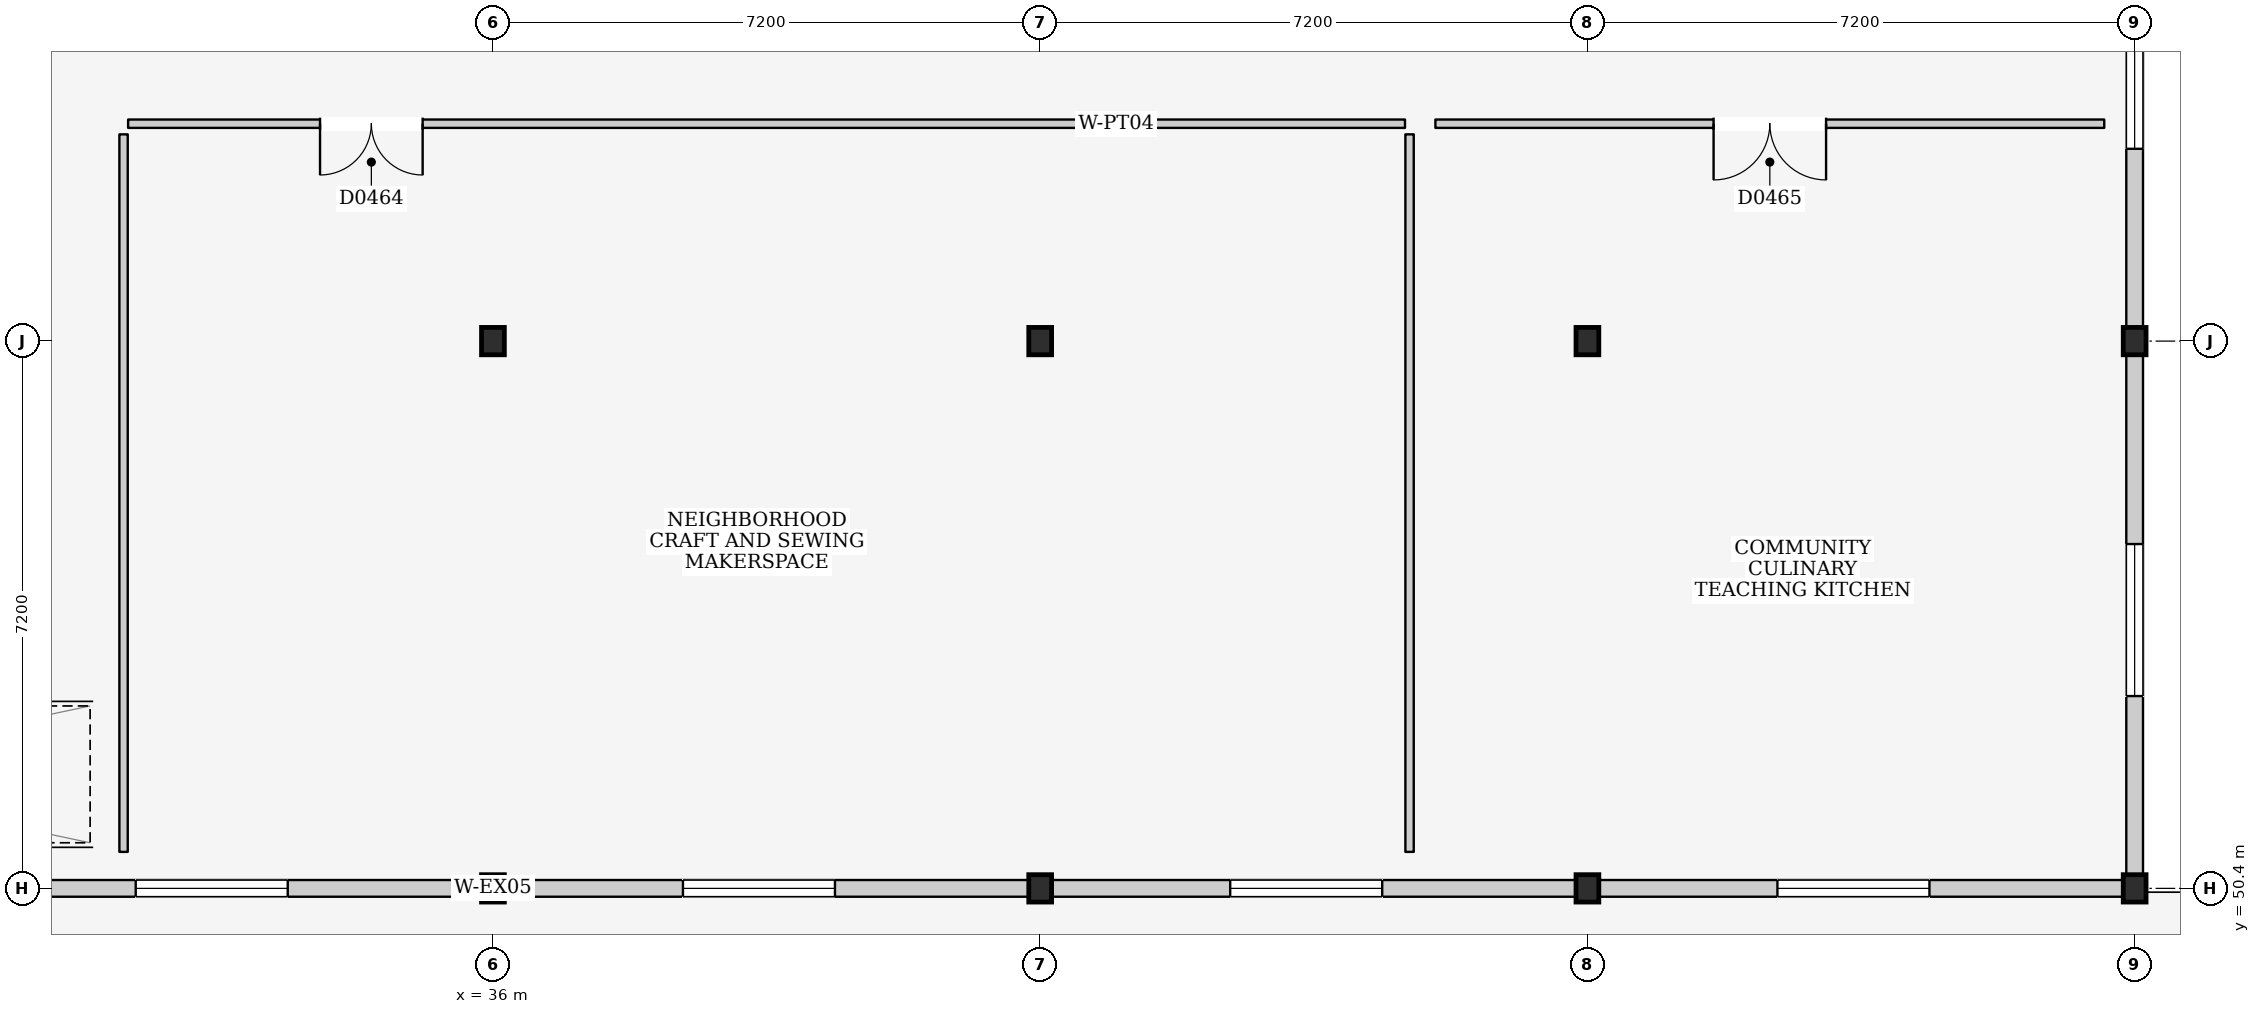
"""IFC4 building model, lengths in metres.
Left out: names, types, materials, properties, quantities, classifications, styles, units other than length and angle.
Written with IfcOpenShell. Run it as: python <this file> out.ifc"""

import sys

from ifc_helpers import new_model, si_unit, direction, frame, frame_2d, origin, origin_2d, place, context, subcontext, project, spatial, rectangle, i_section, extrude, element, fill, save


model = new_model("IFC4")
c1 = context("Model", 3, precision=1e-05, world=origin(), true_north=direction((0.0, 1.0)))
c2 = subcontext(c1, "Body", "Model", "MODEL_VIEW")
j1 = project(units=[si_unit("LENGTHUNIT", "METRE"), si_unit("PLANEANGLEUNIT", "RADIAN")], contexts=[c1])
p1 = place(None, origin())
s1 = spatial("IfcSite", under=j1, at=p1, CompositionType="ELEMENT")
p2 = place(p1, origin())
s2 = spatial("IfcBuilding", under=s1, at=p2, CompositionType="ELEMENT")
p3 = place(p2, frame((0.0, 0.0, 4.5)))
s3 = spatial("IfcBuildingStorey", under=s2, at=p3, CompositionType="ELEMENT", Elevation=4.5)
for number, where, z_axis, x_axis in (
    (1, (36.0, 50.4, 0.0), (0.0, 0.0, 1.0), (1.0, 0.0, 0.0)),
    (2, (36.0, 57.6, 0.0), (0.0, 0.0, 1.0), (1.0, 0.0, 0.0)),
    (3, (43.2, 50.4, 0.0), (0.0, 0.0, 1.0), (1.0, 0.0, 0.0)),
    (4, (43.2, 57.6, 0.0), (0.0, 0.0, 1.0), (1.0, 0.0, 0.0)),
    (5, (50.4, 50.4, 0.0), (0.0, 0.0, 1.0), (1.0, 0.0, 0.0)),
    (6, (50.4, 57.6, 0.0), (0.0, 0.0, 1.0), (1.0, 0.0, 0.0)),
    (7, (57.6, 50.4, 0.0), (0.0, 0.0, 1.0), (1.0, 0.0, 0.0)),
    (8, (57.6, 57.6, 0.0), (0.0, 0.0, 1.0), (1.0, 0.0, 0.0)),
):
    element("IfcColumn", number, at=place(p3, frame(where, z_axis=z_axis, x_axis=x_axis)), inside=s3, PredefinedType="COLUMN", context=c2, shape_type="SweptSolid", body=[
        extrude(i_section(OverallWidth=0.3, OverallDepth=0.36, WebThickness=0.012, FlangeThickness=0.022, at=origin_2d()), origin(), (0.0, 0.0, 1.0), 4.5),
    ])
p4 = place(p3, frame((28.95, 50.4, 0.0), z_axis=(0.0, 0.0, 1.0), x_axis=(1.0, 0.0, 0.0)))
e9 = element("IfcWall", 9, at=p4, inside=s3, PredefinedType="ELEMENTEDWALL", context=c2, shape_type="SweptSolid", body=[
    extrude(rectangle(XDim=6.9, YDim=0.22, at=frame_2d((3.45, 0.0))), origin(), (0.0, 0.0, 1.0), 3.9),
])
p5 = place(p4, frame((2.35, 0.0, 0.95)))
e10 = element("IfcOpeningElement", 10, at=p5, cuts=e9, PredefinedType="OPENING", context=c2, shape_type="SweptSolid", body=[
    extrude(rectangle(XDim=2.0, YDim=1.5, at=frame_2d((1.0, 0.75))), frame((0.0, 0.125, 0.0), z_axis=(0.0, -1.0, 0.0), x_axis=(1.0, 0.0, 0.0)), (0.0, 0.0, 1.0), 0.25),
])
p6 = place(p3, frame((36.15, 50.4, 0.0), z_axis=(0.0, 0.0, 1.0), x_axis=(1.0, 0.0, 0.0)))
e11 = element("IfcWall", 11, at=p6, inside=s3, PredefinedType="ELEMENTEDWALL", context=c2, shape_type="SweptSolid", body=[
    extrude(rectangle(XDim=6.9, YDim=0.22, at=frame_2d((3.45, 0.0))), origin(), (0.0, 0.0, 1.0), 3.9),
])
p7 = place(p6, frame((2.35, 0.0, 0.95)))
e12 = element("IfcOpeningElement", 12, at=p7, cuts=e11, PredefinedType="OPENING", context=c2, shape_type="SweptSolid", body=[
    extrude(rectangle(XDim=2.0, YDim=1.5, at=frame_2d((1.0, 0.75))), frame((0.0, 0.125, 0.0), z_axis=(0.0, -1.0, 0.0), x_axis=(1.0, 0.0, 0.0)), (0.0, 0.0, 1.0), 0.25),
])
p8 = place(p3, frame((43.35, 50.4, 0.0), z_axis=(0.0, 0.0, 1.0), x_axis=(1.0, 0.0, 0.0)))
e13 = element("IfcWall", 13, at=p8, inside=s3, PredefinedType="ELEMENTEDWALL", context=c2, shape_type="SweptSolid", body=[
    extrude(rectangle(XDim=6.9, YDim=0.22, at=frame_2d((3.45, 0.0))), origin(), (0.0, 0.0, 1.0), 3.9),
])
p9 = place(p8, frame((2.35, 0.0, 0.95)))
e14 = element("IfcOpeningElement", 14, at=p9, cuts=e13, PredefinedType="OPENING", context=c2, shape_type="SweptSolid", body=[
    extrude(rectangle(XDim=2.0, YDim=1.5, at=frame_2d((1.0, 0.75))), frame((0.0, 0.125, 0.0), z_axis=(0.0, -1.0, 0.0), x_axis=(1.0, 0.0, 0.0)), (0.0, 0.0, 1.0), 0.25),
])
p10 = place(p3, frame((50.55, 50.4, 0.0), z_axis=(0.0, 0.0, 1.0), x_axis=(1.0, 0.0, 0.0)))
e15 = element("IfcWall", 15, at=p10, inside=s3, PredefinedType="ELEMENTEDWALL", context=c2, shape_type="SweptSolid", body=[
    extrude(rectangle(XDim=6.9, YDim=0.22, at=frame_2d((3.45, 0.0))), origin(), (0.0, 0.0, 1.0), 3.9),
])
p11 = place(p10, frame((2.35, 0.0, 0.95)))
e16 = element("IfcOpeningElement", 16, at=p11, cuts=e15, PredefinedType="OPENING", context=c2, shape_type="SweptSolid", body=[
    extrude(rectangle(XDim=2.0, YDim=1.5, at=frame_2d((1.0, 0.75))), frame((0.0, 0.125, 0.0), z_axis=(0.0, -1.0, 0.0), x_axis=(1.0, 0.0, 0.0)), (0.0, 0.0, 1.0), 0.25),
])
p12 = place(p3, frame((57.6, 50.58, 0.0), z_axis=(0.0, 0.0, 1.0), x_axis=(0.0, 1.0, 0.0)))
e17 = element("IfcWall", 17, at=p12, inside=s3, PredefinedType="ELEMENTEDWALL", context=c2, shape_type="SweptSolid", body=[
    extrude(rectangle(XDim=6.84, YDim=0.22, at=frame_2d((3.42, 0.0))), origin(), (0.0, 0.0, 1.0), 3.9),
])
p13 = place(p12, frame((2.35, 0.0, 0.95)))
e18 = element("IfcOpeningElement", 18, at=p13, cuts=e17, PredefinedType="OPENING", context=c2, shape_type="SweptSolid", body=[
    extrude(rectangle(XDim=2.0, YDim=1.5, at=frame_2d((1.0, 0.75))), frame((0.0, 0.125, 0.0), z_axis=(0.0, -1.0, 0.0), x_axis=(1.0, 0.0, 0.0)), (0.0, 0.0, 1.0), 0.25),
])
p14 = place(p3, frame((57.6, 57.78, 0.0), z_axis=(0.0, 0.0, 1.0), x_axis=(0.0, 1.0, 0.0)))
e19 = element("IfcWall", 19, at=p14, inside=s3, PredefinedType="ELEMENTEDWALL", context=c2, shape_type="SweptSolid", body=[
    extrude(rectangle(XDim=6.84, YDim=0.22, at=frame_2d((3.42, 0.0))), origin(), (0.0, 0.0, 1.0), 3.9),
])
p15 = place(p14, frame((2.35, 0.0, 0.95)))
e20 = element("IfcOpeningElement", 20, at=p15, cuts=e19, PredefinedType="OPENING", context=c2, shape_type="SweptSolid", body=[
    extrude(rectangle(XDim=2.0, YDim=1.5, at=frame_2d((1.0, 0.75))), frame((0.0, 0.125, 0.0), z_axis=(0.0, -1.0, 0.0), x_axis=(1.0, 0.0, 0.0)), (0.0, 0.0, 1.0), 0.25),
])
p16 = place(p3, frame((31.2, 60.46, 0.0), z_axis=(0.0, 0.0, 1.0), x_axis=(1.0, 0.0, 0.0)))
e21 = element("IfcWall", 21, at=p16, inside=s3, PredefinedType="PARTITIONING", context=c2, shape_type="SweptSolid", body=[
    extrude(rectangle(XDim=16.8, YDim=0.11, at=frame_2d((8.4, 0.0))), origin(), (0.0, 0.0, 1.0), 4.25),
])
p17 = place(p16, frame((2.525, 0.0, 0.0)))
e22 = element("IfcOpeningElement", 22, at=p17, cuts=e21, PredefinedType="OPENING", context=c2, shape_type="SweptSolid", body=[
    extrude(rectangle(XDim=1.35, YDim=2.3, at=frame_2d((0.675, 1.15))), frame((0.0, 0.07, 0.0), z_axis=(0.0, -1.0, 0.0), x_axis=(1.0, 0.0, 0.0)), (0.0, 0.0, 1.0), 0.14),
])
for number, where, z_axis, x_axis in (
    (23, (31.14, 50.88, 0.0), (0.0, 0.0, 1.0), (0.0, 1.0, 0.0)),
    (24, (48.06, 50.88, 0.0), (0.0, 0.0, 1.0), (0.0, 1.0, 0.0)),
):
    element("IfcWall", number, at=place(p3, frame(where, z_axis=z_axis, x_axis=x_axis)), inside=s3, PredefinedType="PARTITIONING", context=c2, shape_type="SweptSolid", body=[
        extrude(rectangle(XDim=9.44, YDim=0.11, at=frame_2d((4.72, 0.0))), origin(), (0.0, 0.0, 1.0), 4.25),
    ])
p18 = place(p3, frame((48.4, 60.46, 0.0), z_axis=(0.0, 0.0, 1.0), x_axis=(1.0, 0.0, 0.0)))
e25 = element("IfcWall", 25, at=p18, inside=s3, PredefinedType="PARTITIONING", context=c2, shape_type="SweptSolid", body=[
    extrude(rectangle(XDim=8.8, YDim=0.11, at=frame_2d((4.4, 0.0))), origin(), (0.0, 0.0, 1.0), 4.25),
])
p19 = place(p18, frame((3.66, 0.0, 0.0)))
e26 = element("IfcOpeningElement", 26, at=p19, cuts=e25, PredefinedType="OPENING", context=c2, shape_type="SweptSolid", body=[
    extrude(rectangle(XDim=1.48, YDim=2.3, at=frame_2d((0.74, 1.15))), frame((0.0, 0.07, 0.0), z_axis=(0.0, -1.0, 0.0), x_axis=(1.0, 0.0, 0.0)), (0.0, 0.0, 1.0), 0.14),
])
p20 = place(p5, origin())
e27 = element("IfcWindow", 27, at=p20, inside=s3, PartitioningType="DOUBLE_PANEL_VERTICAL", PredefinedType="WINDOW", context=c2, shape_type="SweptSolid", body=[
    extrude(rectangle(XDim=2.0, YDim=1.5, at=frame_2d((1.0, 0.75))), frame((0.0, 0.03, 0.0), z_axis=(0.0, -1.0, 0.0), x_axis=(1.0, 0.0, 0.0)), (0.0, 0.0, 1.0), 0.06),
])
fill(e10, e27)
p21 = place(p7, origin())
e28 = element("IfcWindow", 28, at=p21, inside=s3, PartitioningType="DOUBLE_PANEL_VERTICAL", PredefinedType="WINDOW", context=c2, shape_type="SweptSolid", body=[
    extrude(rectangle(XDim=2.0, YDim=1.5, at=frame_2d((1.0, 0.75))), frame((0.0, 0.03, 0.0), z_axis=(0.0, -1.0, 0.0), x_axis=(1.0, 0.0, 0.0)), (0.0, 0.0, 1.0), 0.06),
])
fill(e12, e28)
p22 = place(p9, origin())
e29 = element("IfcWindow", 29, at=p22, inside=s3, PartitioningType="DOUBLE_PANEL_VERTICAL", PredefinedType="WINDOW", context=c2, shape_type="SweptSolid", body=[
    extrude(rectangle(XDim=2.0, YDim=1.5, at=frame_2d((1.0, 0.75))), frame((0.0, 0.03, 0.0), z_axis=(0.0, -1.0, 0.0), x_axis=(1.0, 0.0, 0.0)), (0.0, 0.0, 1.0), 0.06),
])
fill(e14, e29)
p23 = place(p11, origin())
e30 = element("IfcWindow", 30, at=p23, inside=s3, PartitioningType="DOUBLE_PANEL_VERTICAL", PredefinedType="WINDOW", context=c2, shape_type="SweptSolid", body=[
    extrude(rectangle(XDim=2.0, YDim=1.5, at=frame_2d((1.0, 0.75))), frame((0.0, 0.03, 0.0), z_axis=(0.0, -1.0, 0.0), x_axis=(1.0, 0.0, 0.0)), (0.0, 0.0, 1.0), 0.06),
])
fill(e16, e30)
p24 = place(p13, origin())
e31 = element("IfcWindow", 31, at=p24, inside=s3, PartitioningType="DOUBLE_PANEL_VERTICAL", PredefinedType="WINDOW", context=c2, shape_type="SweptSolid", body=[
    extrude(rectangle(XDim=2.0, YDim=1.5, at=frame_2d((1.0, 0.75))), frame((0.0, 0.03, 0.0), z_axis=(0.0, -1.0, 0.0), x_axis=(1.0, 0.0, 0.0)), (0.0, 0.0, 1.0), 0.06),
])
fill(e18, e31)
p25 = place(p15, origin())
e32 = element("IfcWindow", 32, at=p25, inside=s3, PartitioningType="DOUBLE_PANEL_VERTICAL", PredefinedType="WINDOW", context=c2, shape_type="SweptSolid", body=[
    extrude(rectangle(XDim=2.0, YDim=1.5, at=frame_2d((1.0, 0.75))), frame((0.0, 0.03, 0.0), z_axis=(0.0, -1.0, 0.0), x_axis=(1.0, 0.0, 0.0)), (0.0, 0.0, 1.0), 0.06),
])
fill(e20, e32)
p26 = place(p17, frame((1.35, 0.0, 0.0), z_axis=(0.0, 0.0, 1.0), x_axis=(-1.0, 0.0, 0.0)))
e33 = element("IfcDoor", 33, at=p26, inside=s3, OperationType="DOUBLE_DOOR_SINGLE_SWING", PredefinedType="DOOR", context=c2, shape_type="SweptSolid", body=[
    extrude(rectangle(XDim=1.35, YDim=2.3, at=frame_2d((0.675, 1.15))), frame((0.0, 0.025, 0.0), z_axis=(0.0, -1.0, 0.0), x_axis=(1.0, 0.0, 0.0)), (0.0, 0.0, 1.0), 0.05),
])
fill(e22, e33)
p27 = place(p19, frame((1.48, 0.0, 0.0), z_axis=(0.0, 0.0, 1.0), x_axis=(-1.0, 0.0, 0.0)))
e34 = element("IfcDoor", 34, at=p27, inside=s3, OperationType="DOUBLE_DOOR_SINGLE_SWING", PredefinedType="DOOR", context=c2, shape_type="SweptSolid", body=[
    extrude(rectangle(XDim=1.48, YDim=2.3, at=frame_2d((0.74, 1.15))), frame((0.0, 0.025, 0.0), z_axis=(0.0, -1.0, 0.0), x_axis=(1.0, 0.0, 0.0)), (0.0, 0.0, 1.0), 0.05),
])
fill(e26, e34)
save(model, sys.argv[1])
